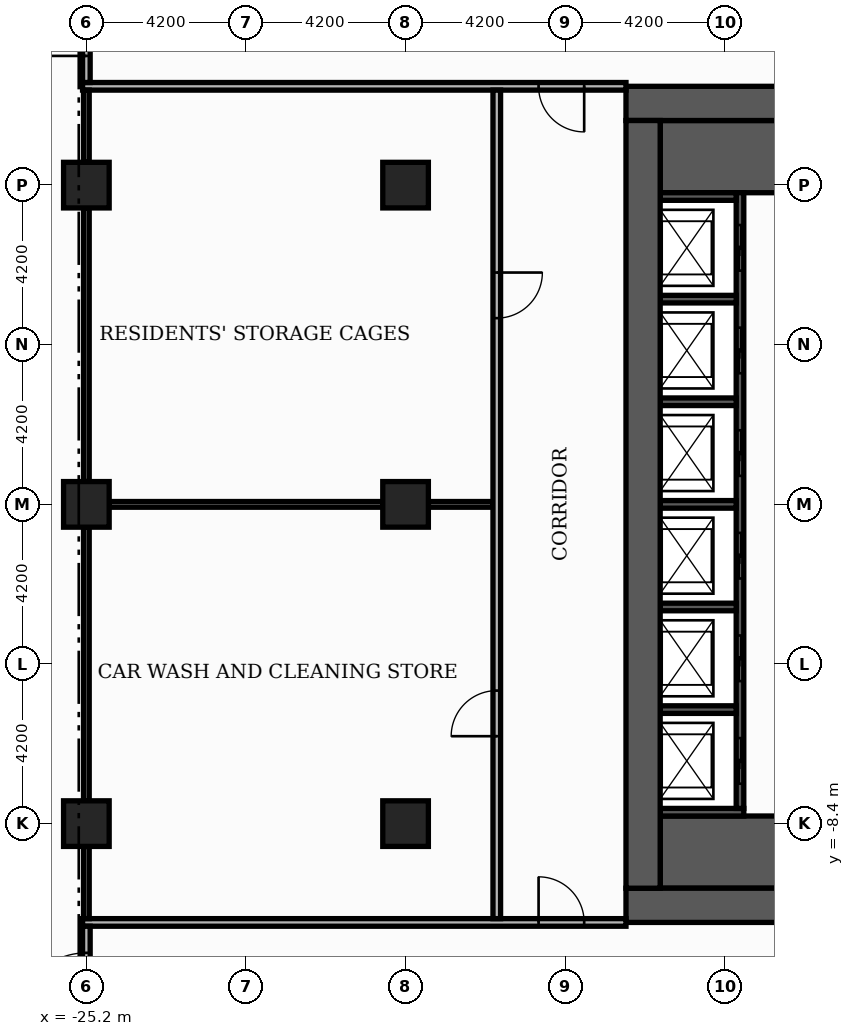
"""IFC4 building model, lengths in metres.
Left out: names, types, materials, properties, quantities, classifications, styles, units other than length and angle.
Written with IfcOpenShell. Run it as: python <this file> out.ifc"""

import sys

from ifc_helpers import new_model, si_unit, direction, frame, frame_2d, origin, origin_2d, place, context, subcontext, project, spatial, rectangle, extrude, element, fill, save


model = new_model("IFC4")
c1 = context("Model", 3, precision=1e-05, world=origin(), true_north=direction((0.0, 1.0)))
c2 = subcontext(c1, "Body", "Model", "MODEL_VIEW")
j1 = project(units=[si_unit("LENGTHUNIT", "METRE"), si_unit("PLANEANGLEUNIT", "RADIAN")], contexts=[c1])
p1 = place(None, origin())
s1 = spatial("IfcSite", under=j1, at=p1, CompositionType="ELEMENT")
p2 = place(p1, origin())
s2 = spatial("IfcBuilding", under=s1, at=p2, CompositionType="ELEMENT")
p3 = place(p2, frame((0.0, 0.0, -4.2)))
s3 = spatial("IfcBuildingStorey", under=s2, at=p3, CompositionType="ELEMENT", Elevation=-4.2)
for number, where, z_axis, x_axis in (
    (1, (-10.1, -9.15, 0.0), (0.0, 0.0, 1.0), (1.0, 0.0, 0.0)),
    (2, (-10.1, 9.15, 0.0), (0.0, 0.0, 1.0), (1.0, 0.0, 0.0)),
):
    element("IfcWall", number, at=place(p3, frame(where, z_axis=z_axis, x_axis=x_axis)), inside=s3, PredefinedType="SHEAR", context=c2, shape_type="SweptSolid", body=[
        extrude(rectangle(XDim=4.6, YDim=1.9, at=frame_2d((2.3, 0.0))), origin(), (0.0, 0.0, 1.0), 3.78),
    ])
p4 = place(p3, frame((-10.1, -8.1, 0.0), z_axis=(0.0, 0.0, 1.0), x_axis=(1.0, 0.0, 0.0)))
e3 = element("IfcWall", 3, at=p4, inside=s3, PredefinedType="SHEAR", context=c2, shape_type="SweptSolid", body=[
    extrude(rectangle(XDim=2.2, YDim=0.2, at=frame_2d((1.1, 0.0))), origin(), (0.0, 0.0, 1.0), 3.78),
])
p5 = place(p3, frame((-8.0, -8.0, 0.0), z_axis=(0.0, 0.0, 1.0), x_axis=(0.0, 1.0, 0.0)))
e4 = element("IfcWall", 4, at=p5, inside=s3, PredefinedType="SHEAR", context=c2, shape_type="SweptSolid", body=[
    extrude(rectangle(XDim=16.2, YDim=0.2, at=frame_2d((8.1, 0.0))), origin(), (0.0, 0.0, 1.0), 3.78),
])
p6 = place(p5, frame((0.65, 0.0, 0.0)))
e5 = element("IfcOpeningElement", 5, at=p6, cuts=e4, PredefinedType="OPENING", context=c2, shape_type="SweptSolid", body=[
    extrude(rectangle(XDim=1.2, YDim=2.1, at=frame_2d((0.6, 1.05))), frame((0.0, 0.11, 0.0), z_axis=(0.0, -1.0, 0.0), x_axis=(1.0, 0.0, 0.0)), (0.0, 0.0, 1.0), 0.22),
])
p7 = place(p5, frame((3.35, 0.0, 0.0)))
e6 = element("IfcOpeningElement", 6, at=p7, cuts=e4, PredefinedType="OPENING", context=c2, shape_type="SweptSolid", body=[
    extrude(rectangle(XDim=1.2, YDim=2.1, at=frame_2d((0.6, 1.05))), frame((0.0, 0.11, 0.0), z_axis=(0.0, -1.0, 0.0), x_axis=(1.0, 0.0, 0.0)), (0.0, 0.0, 1.0), 0.22),
])
p8 = place(p5, frame((6.05, 0.0, 0.0)))
e7 = element("IfcOpeningElement", 7, at=p8, cuts=e4, PredefinedType="OPENING", context=c2, shape_type="SweptSolid", body=[
    extrude(rectangle(XDim=1.2, YDim=2.1, at=frame_2d((0.6, 1.05))), frame((0.0, 0.11, 0.0), z_axis=(0.0, -1.0, 0.0), x_axis=(1.0, 0.0, 0.0)), (0.0, 0.0, 1.0), 0.22),
])
p9 = place(p5, frame((8.75, 0.0, 0.0)))
e8 = element("IfcOpeningElement", 8, at=p9, cuts=e4, PredefinedType="OPENING", context=c2, shape_type="SweptSolid", body=[
    extrude(rectangle(XDim=1.2, YDim=2.1, at=frame_2d((0.6, 1.05))), frame((0.0, 0.11, 0.0), z_axis=(0.0, -1.0, 0.0), x_axis=(1.0, 0.0, 0.0)), (0.0, 0.0, 1.0), 0.22),
])
p10 = place(p5, frame((11.45, 0.0, 0.0)))
e9 = element("IfcOpeningElement", 9, at=p10, cuts=e4, PredefinedType="OPENING", context=c2, shape_type="SweptSolid", body=[
    extrude(rectangle(XDim=1.2, YDim=2.1, at=frame_2d((0.6, 1.05))), frame((0.0, 0.11, 0.0), z_axis=(0.0, -1.0, 0.0), x_axis=(1.0, 0.0, 0.0)), (0.0, 0.0, 1.0), 0.22),
])
p11 = place(p5, frame((14.15, 0.0, 0.0)))
e10 = element("IfcOpeningElement", 10, at=p11, cuts=e4, PredefinedType="OPENING", context=c2, shape_type="SweptSolid", body=[
    extrude(rectangle(XDim=1.2, YDim=2.1, at=frame_2d((0.6, 1.05))), frame((0.0, 0.11, 0.0), z_axis=(0.0, -1.0, 0.0), x_axis=(1.0, 0.0, 0.0)), (0.0, 0.0, 1.0), 0.22),
])
for number, where, z_axis, x_axis in (
    (11, (-10.1, -5.4, 0.0), (0.0, 0.0, 1.0), (1.0, 0.0, 0.0)),
    (12, (-10.1, -2.7, 0.0), (0.0, 0.0, 1.0), (1.0, 0.0, 0.0)),
    (13, (-10.1, 0.0, 0.0), (0.0, 0.0, 1.0), (1.0, 0.0, 0.0)),
    (14, (-10.1, 2.7, 0.0), (0.0, 0.0, 1.0), (1.0, 0.0, 0.0)),
    (15, (-10.1, 5.4, 0.0), (0.0, 0.0, 1.0), (1.0, 0.0, 0.0)),
    (16, (-10.1, 8.1, 0.0), (0.0, 0.0, 1.0), (1.0, 0.0, 0.0)),
):
    element("IfcWall", number, at=place(p3, frame(where, z_axis=z_axis, x_axis=x_axis)), inside=s3, PredefinedType="SHEAR", context=c2, shape_type="SweptSolid", body=[
        extrude(rectangle(XDim=2.0, YDim=0.2, at=frame_2d((1.0, 0.0))), origin(), (0.0, 0.0, 1.0), 3.78),
    ])
p12 = place(p3, frame((-11.0, -10.55, 0.0), z_axis=(0.0, 0.0, 1.0), x_axis=(1.0, 0.0, 0.0)))
e17 = element("IfcWall", 17, at=p12, inside=s3, PredefinedType="SHEAR", context=c2, shape_type="SweptSolid", body=[
    extrude(rectangle(XDim=22.0, YDim=0.9, at=frame_2d((11.0, 0.0))), origin(), (0.0, 0.0, 1.0), 3.78),
])
p13 = place(p12, frame((7.4, 0.0, 0.0)))
e18 = element("IfcOpeningElement", 18, at=p13, cuts=e17, PredefinedType="OPENING", context=c2, shape_type="SweptSolid", body=[
    extrude(rectangle(XDim=1.8, YDim=2.2, at=frame_2d((0.9, 1.1))), frame((0.0, 0.46, 0.0), z_axis=(0.0, -1.0, 0.0), x_axis=(1.0, 0.0, 0.0)), (0.0, 0.0, 1.0), 0.92),
])
p14 = place(p3, frame((-11.0, 10.55, 0.0), z_axis=(0.0, 0.0, 1.0), x_axis=(1.0, 0.0, 0.0)))
e19 = element("IfcWall", 19, at=p14, inside=s3, PredefinedType="SHEAR", context=c2, shape_type="SweptSolid", body=[
    extrude(rectangle(XDim=22.0, YDim=0.9, at=frame_2d((11.0, 0.0))), origin(), (0.0, 0.0, 1.0), 3.78),
])
p15 = place(p14, frame((13.3, 0.0, 0.0)))
e20 = element("IfcOpeningElement", 20, at=p15, cuts=e19, PredefinedType="OPENING", context=c2, shape_type="SweptSolid", body=[
    extrude(rectangle(XDim=1.8, YDim=2.2, at=frame_2d((0.9, 1.1))), frame((0.0, 0.46, 0.0), z_axis=(0.0, -1.0, 0.0), x_axis=(1.0, 0.0, 0.0)), (0.0, 0.0, 1.0), 0.92),
])
p16 = place(p3, frame((-10.55, -10.1, 0.0), z_axis=(0.0, 0.0, 1.0), x_axis=(0.0, 1.0, 0.0)))
e21 = element("IfcWall", 21, at=p16, inside=s3, PredefinedType="SHEAR", context=c2, shape_type="SweptSolid", body=[
    extrude(rectangle(XDim=20.2, YDim=0.9, at=frame_2d((10.1, 0.0))), origin(), (0.0, 0.0, 1.0), 3.78),
])
for number, where, z_axis, x_axis in (
    (22, (-25.2, 0.0, 0.0), (0.0, 0.0, 1.0), (1.0, 0.0, 0.0)),
    (23, (-25.2, -8.4, 0.0), (0.0, 0.0, 1.0), (1.0, 0.0, 0.0)),
    (24, (-25.2, 8.4, 0.0), (0.0, 0.0, 1.0), (1.0, 0.0, 0.0)),
    (25, (-16.8, 0.0, 0.0), (0.0, 0.0, 1.0), (1.0, 0.0, 0.0)),
    (26, (-16.8, 8.4, 0.0), (0.0, 0.0, 1.0), (1.0, 0.0, 0.0)),
    (27, (-16.8, -8.4, 0.0), (0.0, 0.0, 1.0), (1.0, 0.0, 0.0)),
):
    element("IfcColumn", number, at=place(p3, frame(where, z_axis=z_axis, x_axis=x_axis)), inside=s3, PredefinedType="COLUMN", context=c2, shape_type="SweptSolid", body=[
        extrude(rectangle(XDim=1.2, YDim=1.2, at=origin_2d()), origin(), (0.0, 0.0, 1.0), 4.2),
    ])
p17 = place(p3, frame((-25.3, -11.0, 0.0), z_axis=(0.0, 0.0, 1.0), x_axis=(1.0, 0.0, 0.0)))
e28 = element("IfcWall", 28, at=p17, inside=s3, PredefinedType="PARTITIONING", context=c2, shape_type="SweptSolid", body=[
    extrude(rectangle(XDim=14.3, YDim=0.2, at=frame_2d((7.15, 0.0))), origin(), (0.0, 0.0, 1.0), 3.78),
])
p18 = place(p17, frame((12.0, 0.0, 0.0)))
e29 = element("IfcOpeningElement", 29, at=p18, cuts=e28, PredefinedType="OPENING", context=c2, shape_type="SweptSolid", body=[
    extrude(rectangle(XDim=1.2, YDim=2.2, at=frame_2d((0.6, 1.1))), frame((0.0, 0.11, 0.0), z_axis=(0.0, -1.0, 0.0), x_axis=(1.0, 0.0, 0.0)), (0.0, 0.0, 1.0), 0.22),
])
p19 = place(p3, frame((-24.6, 0.0, 0.0), z_axis=(0.0, 0.0, 1.0), x_axis=(1.0, 0.0, 0.0)))
e30 = element("IfcWall", 30, at=p19, inside=s3, PredefinedType="PARTITIONING", context=c2, shape_type="SweptSolid", body=[
    extrude(rectangle(XDim=7.2, YDim=0.15, at=frame_2d((3.6, 0.0))), origin(), (0.0, 0.0, 1.0), 3.78),
])
p20 = place(p3, frame((-16.2, 0.0, 0.0), z_axis=(0.0, 0.0, 1.0), x_axis=(1.0, 0.0, 0.0)))
e31 = element("IfcWall", 31, at=p20, inside=s3, PredefinedType="PARTITIONING", context=c2, shape_type="SweptSolid", body=[
    extrude(rectangle(XDim=1.7, YDim=0.15, at=frame_2d((0.85, 0.0))), origin(), (0.0, 0.0, 1.0), 3.78),
])
p21 = place(p3, frame((-25.3, 11.0, 0.0), z_axis=(0.0, 0.0, 1.0), x_axis=(1.0, 0.0, 0.0)))
e32 = element("IfcWall", 32, at=p21, inside=s3, PredefinedType="PARTITIONING", context=c2, shape_type="SweptSolid", body=[
    extrude(rectangle(XDim=14.3, YDim=0.2, at=frame_2d((7.15, 0.0))), origin(), (0.0, 0.0, 1.0), 3.78),
])
p22 = place(p21, frame((12.0, 0.0, 0.0)))
e33 = element("IfcOpeningElement", 33, at=p22, cuts=e32, PredefinedType="OPENING", context=c2, shape_type="SweptSolid", body=[
    extrude(rectangle(XDim=1.2, YDim=2.2, at=frame_2d((0.6, 1.1))), frame((0.0, 0.11, 0.0), z_axis=(0.0, -1.0, 0.0), x_axis=(1.0, 0.0, 0.0)), (0.0, 0.0, 1.0), 0.22),
])
p23 = place(p3, frame((-25.2, -14.3, 0.0), z_axis=(0.0, 0.0, 1.0), x_axis=(0.0, 1.0, 0.0)))
e34 = element("IfcWall", 34, at=p23, inside=s3, PredefinedType="PARTITIONING", context=c2, shape_type="SweptSolid", body=[
    extrude(rectangle(XDim=3.2, YDim=0.2, at=frame_2d((1.6, 0.0))), origin(), (0.0, 0.0, 1.0), 3.78),
])
p24 = place(p23, frame((0.7, 0.0, 0.0)))
e35 = element("IfcOpeningElement", 35, at=p24, cuts=e34, PredefinedType="OPENING", context=c2, shape_type="SweptSolid", body=[
    extrude(rectangle(XDim=1.8, YDim=2.2, at=frame_2d((0.9, 1.1))), frame((0.0, 0.11, 0.0), z_axis=(0.0, -1.0, 0.0), x_axis=(1.0, 0.0, 0.0)), (0.0, 0.0, 1.0), 0.22),
])
p25 = place(p3, frame((-25.2, -10.9, 0.0), z_axis=(0.0, 0.0, 1.0), x_axis=(0.0, 1.0, 0.0)))
e36 = element("IfcWall", 36, at=p25, inside=s3, PredefinedType="PARTITIONING", context=c2, shape_type="SweptSolid", body=[
    extrude(rectangle(XDim=1.9, YDim=0.15, at=frame_2d((0.95, 0.0))), origin(), (0.0, 0.0, 1.0), 3.78),
])
for number, where, z_axis, x_axis in (
    (37, (-25.2, -7.8, 0.0), (0.0, 0.0, 1.0), (0.0, 1.0, 0.0)),
    (38, (-25.2, 0.6, 0.0), (0.0, 0.0, 1.0), (0.0, 1.0, 0.0)),
):
    element("IfcWall", number, at=place(p3, frame(where, z_axis=z_axis, x_axis=x_axis)), inside=s3, PredefinedType="PARTITIONING", context=c2, shape_type="SweptSolid", body=[
        extrude(rectangle(XDim=7.2, YDim=0.15, at=frame_2d((3.6, 0.0))), origin(), (0.0, 0.0, 1.0), 3.78),
    ])
p26 = place(p3, frame((-25.2, 9.0, 0.0), z_axis=(0.0, 0.0, 1.0), x_axis=(0.0, 1.0, 0.0)))
e39 = element("IfcWall", 39, at=p26, inside=s3, PredefinedType="PARTITIONING", context=c2, shape_type="SweptSolid", body=[
    extrude(rectangle(XDim=1.9, YDim=0.15, at=frame_2d((0.95, 0.0))), origin(), (0.0, 0.0, 1.0), 3.78),
])
p27 = place(p3, frame((-25.2, 11.1, 0.0), z_axis=(0.0, 0.0, 1.0), x_axis=(0.0, 1.0, 0.0)))
e40 = element("IfcWall", 40, at=p27, inside=s3, PredefinedType="PARTITIONING", context=c2, shape_type="SweptSolid", body=[
    extrude(rectangle(XDim=3.2, YDim=0.2, at=frame_2d((1.6, 0.0))), origin(), (0.0, 0.0, 1.0), 3.78),
])
p28 = place(p27, frame((0.7, 0.0, 0.0)))
e41 = element("IfcOpeningElement", 41, at=p28, cuts=e40, PredefinedType="OPENING", context=c2, shape_type="SweptSolid", body=[
    extrude(rectangle(XDim=1.8, YDim=2.2, at=frame_2d((0.9, 1.1))), frame((0.0, 0.11, 0.0), z_axis=(0.0, -1.0, 0.0), x_axis=(1.0, 0.0, 0.0)), (0.0, 0.0, 1.0), 0.22),
])
p29 = place(p3, frame((-14.4, -10.9, 0.0), z_axis=(0.0, 0.0, 1.0), x_axis=(0.0, 1.0, 0.0)))
e42 = element("IfcWall", 42, at=p29, inside=s3, PredefinedType="PARTITIONING", context=c2, shape_type="SweptSolid", body=[
    extrude(rectangle(XDim=21.8, YDim=0.2, at=frame_2d((10.9, 0.0))), origin(), (0.0, 0.0, 1.0), 3.78),
])
p30 = place(p29, frame((4.8, 0.0, 0.0)))
e43 = element("IfcOpeningElement", 43, at=p30, cuts=e42, PredefinedType="OPENING", context=c2, shape_type="SweptSolid", body=[
    extrude(rectangle(XDim=1.2, YDim=2.2, at=frame_2d((0.6, 1.1))), frame((0.0, 0.11, 0.0), z_axis=(0.0, -1.0, 0.0), x_axis=(1.0, 0.0, 0.0)), (0.0, 0.0, 1.0), 0.22),
])
p31 = place(p29, frame((15.8, 0.0, 0.0)))
e44 = element("IfcOpeningElement", 44, at=p31, cuts=e42, PredefinedType="OPENING", context=c2, shape_type="SweptSolid", body=[
    extrude(rectangle(XDim=1.2, YDim=2.2, at=frame_2d((0.6, 1.1))), frame((0.0, 0.11, 0.0), z_axis=(0.0, -1.0, 0.0), x_axis=(1.0, 0.0, 0.0)), (0.0, 0.0, 1.0), 0.22),
])
p32 = place(p6, origin())
e45 = element("IfcDoor", 45, at=p32, inside=s3, OperationType="SLIDING_TO_LEFT", PredefinedType="DOOR", context=c2, shape_type="SweptSolid", body=[
    extrude(rectangle(XDim=1.2, YDim=2.1, at=frame_2d((0.6, 1.05))), frame((0.0, 0.025, 0.0), z_axis=(0.0, -1.0, 0.0), x_axis=(1.0, 0.0, 0.0)), (0.0, 0.0, 1.0), 0.05),
])
fill(e5, e45)
p33 = place(p7, origin())
e46 = element("IfcDoor", 46, at=p33, inside=s3, OperationType="SLIDING_TO_LEFT", PredefinedType="DOOR", context=c2, shape_type="SweptSolid", body=[
    extrude(rectangle(XDim=1.2, YDim=2.1, at=frame_2d((0.6, 1.05))), frame((0.0, 0.025, 0.0), z_axis=(0.0, -1.0, 0.0), x_axis=(1.0, 0.0, 0.0)), (0.0, 0.0, 1.0), 0.05),
])
fill(e6, e46)
p34 = place(p8, origin())
e47 = element("IfcDoor", 47, at=p34, inside=s3, OperationType="SLIDING_TO_LEFT", PredefinedType="DOOR", context=c2, shape_type="SweptSolid", body=[
    extrude(rectangle(XDim=1.2, YDim=2.1, at=frame_2d((0.6, 1.05))), frame((0.0, 0.025, 0.0), z_axis=(0.0, -1.0, 0.0), x_axis=(1.0, 0.0, 0.0)), (0.0, 0.0, 1.0), 0.05),
])
fill(e7, e47)
p35 = place(p9, origin())
e48 = element("IfcDoor", 48, at=p35, inside=s3, OperationType="SLIDING_TO_LEFT", PredefinedType="DOOR", context=c2, shape_type="SweptSolid", body=[
    extrude(rectangle(XDim=1.2, YDim=2.1, at=frame_2d((0.6, 1.05))), frame((0.0, 0.025, 0.0), z_axis=(0.0, -1.0, 0.0), x_axis=(1.0, 0.0, 0.0)), (0.0, 0.0, 1.0), 0.05),
])
fill(e8, e48)
p36 = place(p10, origin())
e49 = element("IfcDoor", 49, at=p36, inside=s3, OperationType="SLIDING_TO_LEFT", PredefinedType="DOOR", context=c2, shape_type="SweptSolid", body=[
    extrude(rectangle(XDim=1.2, YDim=2.1, at=frame_2d((0.6, 1.05))), frame((0.0, 0.025, 0.0), z_axis=(0.0, -1.0, 0.0), x_axis=(1.0, 0.0, 0.0)), (0.0, 0.0, 1.0), 0.05),
])
fill(e9, e49)
p37 = place(p11, origin())
e50 = element("IfcDoor", 50, at=p37, inside=s3, OperationType="SLIDING_TO_LEFT", PredefinedType="DOOR", context=c2, shape_type="SweptSolid", body=[
    extrude(rectangle(XDim=1.2, YDim=2.1, at=frame_2d((0.6, 1.05))), frame((0.0, 0.025, 0.0), z_axis=(0.0, -1.0, 0.0), x_axis=(1.0, 0.0, 0.0)), (0.0, 0.0, 1.0), 0.05),
])
fill(e10, e50)
p38 = place(p24, origin())
e51 = element("IfcDoor", 51, at=p38, inside=s3, OperationType="DOUBLE_DOOR_SINGLE_SWING", PredefinedType="DOOR", context=c2, shape_type="SweptSolid", body=[
    extrude(rectangle(XDim=1.8, YDim=2.2, at=frame_2d((0.9, 1.1))), frame((0.0, 0.025, 0.0), z_axis=(0.0, -1.0, 0.0), x_axis=(1.0, 0.0, 0.0)), (0.0, 0.0, 1.0), 0.05),
])
fill(e35, e51)
p39 = place(p18, origin())
e52 = element("IfcDoor", 52, at=p39, inside=s3, OperationType="SINGLE_SWING_LEFT", PredefinedType="DOOR", context=c2, shape_type="SweptSolid", body=[
    extrude(rectangle(XDim=1.2, YDim=2.2, at=frame_2d((0.6, 1.1))), frame((0.0, 0.025, 0.0), z_axis=(0.0, -1.0, 0.0), x_axis=(1.0, 0.0, 0.0)), (0.0, 0.0, 1.0), 0.05),
])
fill(e29, e52)
p40 = place(p30, origin())
e53 = element("IfcDoor", 53, at=p40, inside=s3, OperationType="SINGLE_SWING_LEFT", PredefinedType="DOOR", context=c2, shape_type="SweptSolid", body=[
    extrude(rectangle(XDim=1.2, YDim=2.2, at=frame_2d((0.6, 1.1))), frame((0.0, 0.025, 0.0), z_axis=(0.0, -1.0, 0.0), x_axis=(1.0, 0.0, 0.0)), (0.0, 0.0, 1.0), 0.05),
])
fill(e43, e53)
p41 = place(p31, origin())
e54 = element("IfcDoor", 54, at=p41, inside=s3, OperationType="SINGLE_SWING_RIGHT", PredefinedType="DOOR", context=c2, shape_type="SweptSolid", body=[
    extrude(rectangle(XDim=1.2, YDim=2.2, at=frame_2d((0.6, 1.1))), frame((0.0, 0.025, 0.0), z_axis=(0.0, -1.0, 0.0), x_axis=(1.0, 0.0, 0.0)), (0.0, 0.0, 1.0), 0.05),
])
fill(e44, e54)
p42 = place(p22, origin())
e55 = element("IfcDoor", 55, at=p42, inside=s3, OperationType="SINGLE_SWING_RIGHT", PredefinedType="DOOR", context=c2, shape_type="SweptSolid", body=[
    extrude(rectangle(XDim=1.2, YDim=2.2, at=frame_2d((0.6, 1.1))), frame((0.0, 0.025, 0.0), z_axis=(0.0, -1.0, 0.0), x_axis=(1.0, 0.0, 0.0)), (0.0, 0.0, 1.0), 0.05),
])
fill(e33, e55)
p43 = place(p28, origin())
e56 = element("IfcDoor", 56, at=p43, inside=s3, OperationType="DOUBLE_DOOR_SINGLE_SWING", PredefinedType="DOOR", context=c2, shape_type="SweptSolid", body=[
    extrude(rectangle(XDim=1.8, YDim=2.2, at=frame_2d((0.9, 1.1))), frame((0.0, 0.025, 0.0), z_axis=(0.0, -1.0, 0.0), x_axis=(1.0, 0.0, 0.0)), (0.0, 0.0, 1.0), 0.05),
])
fill(e41, e56)
save(model, sys.argv[1])
